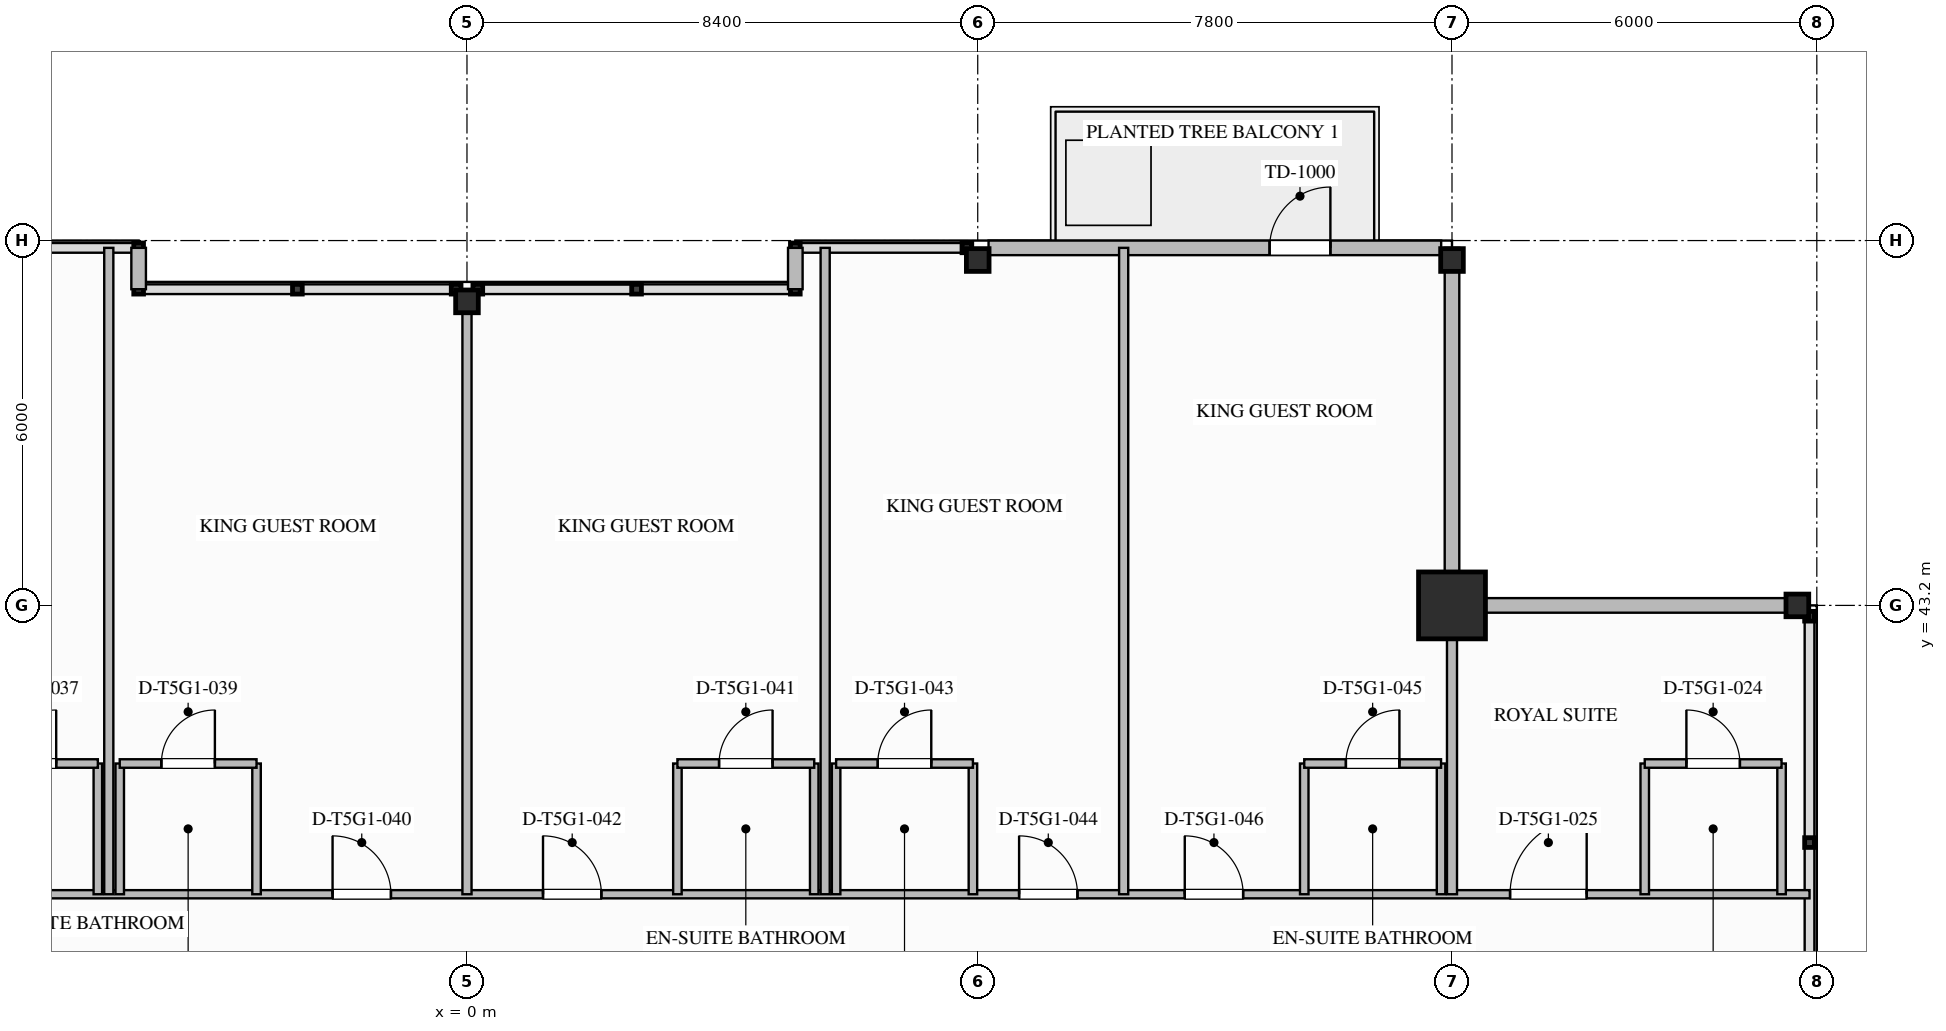
"""IFC4 building model, lengths in metres.
Left out: names, types, materials, properties, quantities, classifications, styles, units other than length and angle.
Written with IfcOpenShell. Run it as: python <this file> out.ifc"""

import sys

from ifc_helpers import new_model, si_unit, direction, frame, frame_2d, origin, origin_2d, place, context, subcontext, project, spatial, rectangle, i_section, extrude, element, fill, save


model = new_model("IFC4")
c1 = context("Model", 3, precision=1e-05, world=origin(), true_north=direction((0.0, 1.0)))
c2 = subcontext(c1, "Body", "Model", "MODEL_VIEW")
j1 = project(units=[si_unit("LENGTHUNIT", "METRE"), si_unit("PLANEANGLEUNIT", "RADIAN")], contexts=[c1])
p1 = place(None, origin())
s1 = spatial("IfcSite", under=j1, at=p1, CompositionType="ELEMENT")
p2 = place(p1, origin())
s2 = spatial("IfcBuilding", under=s1, at=p2, CompositionType="ELEMENT")
p3 = place(p2, frame((0.0, 0.0, 265.0)))
s3 = spatial("IfcBuildingStorey", under=s2, at=p3, CompositionType="ELEMENT", Elevation=265.0)
p4 = place(p3, frame((16.2, 43.2, 0.0), z_axis=(0.0, 0.0, 1.0), x_axis=(1.0, 0.0, 0.0)))
e1 = element("IfcColumn", 1, at=p4, inside=s3, PredefinedType="COLUMN", context=c2, shape_type="SweptSolid", body=[
    extrude(rectangle(XDim=1.1, YDim=1.1, at=origin_2d()), origin(), (0.0, 0.0, 1.0), 3.65),
])
for number, where, z_axis, x_axis in (
    (2, (21.88, 43.2, 0.0), (0.0, 0.0, 1.0), (1.0, 0.0, 0.0)),
    (3, (0.0, 48.2, 0.0), (0.0, 0.0, 1.0), (0.0, 1.0, 0.0)),
    (4, (8.4, 48.88, 0.0), (0.0, 0.0, 1.0), (0.0, 1.0, 0.0)),
    (5, (16.2, 48.88, 0.0), (0.0, 0.0, 1.0), (0.0, 1.0, 0.0)),
):
    element("IfcColumn", number, at=place(p3, frame(where, z_axis=z_axis, x_axis=x_axis)), inside=s3, PredefinedType="COLUMN", context=c2, shape_type="SweptSolid", body=[
        extrude(i_section(OverallWidth=0.374, OverallDepth=0.372, WebThickness=0.016, FlangeThickness=0.026, FilletRadius=0.025, at=origin_2d()), origin(), (0.0, 0.0, 1.0), 3.647),
    ])
p5 = place(p3, frame((8.578, 49.08, 0.0), z_axis=(0.0, 0.0, 1.0), x_axis=(1.0, 0.0, 0.0)))
e6 = element("IfcWall", 6, at=p5, inside=s3, PredefinedType="STANDARD", context=c2, shape_type="SweptSolid", body=[
    extrude(rectangle(XDim=7.444, YDim=0.24, at=frame_2d((3.722, 0.0))), origin(), (0.0, 0.0, 1.0), 2.853),
])
p6 = place(p5, frame((4.622, 0.0, 0.0)))
e7 = element("IfcOpeningElement", 7, at=p6, cuts=e6, PredefinedType="OPENING", context=c2, shape_type="SweptSolid", body=[
    extrude(rectangle(XDim=1.0, YDim=2.2, at=frame_2d((0.5, 1.1))), frame((0.0, 0.13, 0.0), z_axis=(0.0, -1.0, 0.0), x_axis=(1.0, 0.0, 0.0)), (0.0, 0.0, 1.0), 0.26),
])
for number, where, z_axis, x_axis in (
    (8, (16.2, 49.08, 0.0), (0.0, 0.0, 1.0), (0.0, -1.0, 0.0)),
    (9, (16.2, 43.2, 0.0), (0.0, 0.0, 1.0), (1.0, 0.0, 0.0)),
):
    element("IfcWall", number, at=place(p3, frame(where, z_axis=z_axis, x_axis=x_axis)), inside=s3, PredefinedType="STANDARD", context=c2, shape_type="SweptSolid", body=[
        extrude(rectangle(XDim=5.88, YDim=0.24, at=frame_2d((2.94, 0.0))), origin(), (0.0, 0.0, 1.0), 2.779),
    ])
for number, where, z_axis, x_axis in (
    (10, (-5.4, 49.08, 0.0), (0.0, 0.0, 1.0), (0.0, -1.0, 0.0)),
    (11, (5.4, 48.4, 0.0), (0.0, 0.0, 1.0), (0.0, 1.0, 0.0)),
):
    element("IfcWall", number, at=place(p3, frame(where, z_axis=z_axis, x_axis=x_axis)), inside=s3, PredefinedType="STANDARD", context=c2, shape_type="SweptSolid", body=[
        extrude(rectangle(XDim=0.68, YDim=0.24, at=frame_2d((0.34, 0.0))), origin(), (0.0, 0.0, 1.0), 3.39),
    ])
p7 = place(p3, frame((-16.2, 38.45, 0.0), z_axis=(0.0, 0.0, 1.0), x_axis=(1.0, 0.0, 0.0)))
e12 = element("IfcWall", 12, at=p7, inside=s3, PredefinedType="PARTITIONING", context=c2, shape_type="SweptSolid", body=[
    extrude(rectangle(XDim=38.28, YDim=0.135, at=frame_2d((19.14, 0.0))), origin(), (0.0, 0.0, 1.0), 3.39),
])
p8 = place(p7, frame((33.355, 0.0, 0.0)))
e13 = element("IfcOpeningElement", 13, at=p8, cuts=e12, PredefinedType="OPENING", context=c2, shape_type="SweptSolid", body=[
    extrude(rectangle(XDim=1.26, YDim=2.2, at=frame_2d((0.63, 1.1))), frame((0.0, 0.077, 0.0), z_axis=(0.0, -1.0, 0.0), x_axis=(1.0, 0.0, 0.0)), (0.0, 0.0, 1.0), 0.155),
])
p9 = place(p7, frame((3.435, 0.0, 0.0)))
e14 = element("IfcOpeningElement", 14, at=p9, cuts=e12, PredefinedType="OPENING", context=c2, shape_type="SweptSolid", body=[
    extrude(rectangle(XDim=0.96, YDim=2.15, at=frame_2d((0.48, 1.075))), frame((0.0, 0.077, 0.0), z_axis=(0.0, -1.0, 0.0), x_axis=(1.0, 0.0, 0.0)), (0.0, 0.0, 1.0), 0.155),
])
p10 = place(p7, frame((6.16, 0.0, 0.0)))
e15 = element("IfcOpeningElement", 15, at=p10, cuts=e12, PredefinedType="OPENING", context=c2, shape_type="SweptSolid", body=[
    extrude(rectangle(XDim=0.96, YDim=2.15, at=frame_2d((0.48, 1.075))), frame((0.0, 0.077, 0.0), z_axis=(0.0, -1.0, 0.0), x_axis=(1.0, 0.0, 0.0)), (0.0, 0.0, 1.0), 0.155),
])
p11 = place(p7, frame((13.99, 0.0, 0.0)))
e16 = element("IfcOpeningElement", 16, at=p11, cuts=e12, PredefinedType="OPENING", context=c2, shape_type="SweptSolid", body=[
    extrude(rectangle(XDim=0.96, YDim=2.15, at=frame_2d((0.48, 1.075))), frame((0.0, 0.077, 0.0), z_axis=(0.0, -1.0, 0.0), x_axis=(1.0, 0.0, 0.0)), (0.0, 0.0, 1.0), 0.155),
])
p12 = place(p7, frame((17.45, 0.0, 0.0)))
e17 = element("IfcOpeningElement", 17, at=p12, cuts=e12, PredefinedType="OPENING", context=c2, shape_type="SweptSolid", body=[
    extrude(rectangle(XDim=0.96, YDim=2.15, at=frame_2d((0.48, 1.075))), frame((0.0, 0.077, 0.0), z_axis=(0.0, -1.0, 0.0), x_axis=(1.0, 0.0, 0.0)), (0.0, 0.0, 1.0), 0.155),
])
p13 = place(p7, frame((25.281, 0.0, 0.0)))
e18 = element("IfcOpeningElement", 18, at=p13, cuts=e12, PredefinedType="OPENING", context=c2, shape_type="SweptSolid", body=[
    extrude(rectangle(XDim=0.96, YDim=2.15, at=frame_2d((0.48, 1.075))), frame((0.0, 0.077, 0.0), z_axis=(0.0, -1.0, 0.0), x_axis=(1.0, 0.0, 0.0)), (0.0, 0.0, 1.0), 0.155),
])
p14 = place(p7, frame((28.005, 0.0, 0.0)))
e19 = element("IfcOpeningElement", 19, at=p14, cuts=e12, PredefinedType="OPENING", context=c2, shape_type="SweptSolid", body=[
    extrude(rectangle(XDim=0.96, YDim=2.15, at=frame_2d((0.48, 1.075))), frame((0.0, 0.077, 0.0), z_axis=(0.0, -1.0, 0.0), x_axis=(1.0, 0.0, 0.0)), (0.0, 0.0, 1.0), 0.155),
])
p15 = place(p3, frame((16.2, 38.45, 0.0), z_axis=(0.0, 0.0, 1.0), x_axis=(0.0, 1.0, 0.0)))
e20 = element("IfcWall", 20, at=p15, inside=s3, PredefinedType="PARTITIONING", context=c2, shape_type="SweptSolid", body=[
    extrude(rectangle(XDim=4.63, YDim=0.165, at=frame_2d((2.315, 0.0))), origin(), (0.0, 0.0, 1.0), 2.764),
])
for number, where, z_axis, x_axis in (
    (21, (19.37, 38.45, 0.0), (0.0, 0.0, 1.0), (0.0, 1.0, 0.0)),
    (22, (21.62, 38.45, 0.0), (0.0, 0.0, 1.0), (0.0, 1.0, 0.0)),
):
    element("IfcWall", number, at=place(p3, frame(where, z_axis=z_axis, x_axis=x_axis)), inside=s3, PredefinedType="PLUMBINGWALL", context=c2, shape_type="SweptSolid", body=[
        extrude(rectangle(XDim=2.15, YDim=0.14, at=frame_2d((1.075, 0.0))), origin(), (0.0, 0.0, 1.0), 3.39),
    ])
p16 = place(p3, frame((19.37, 40.6, 0.0), z_axis=(0.0, 0.0, 1.0), x_axis=(1.0, 0.0, 0.0)))
e23 = element("IfcWall", 23, at=p16, inside=s3, PredefinedType="PLUMBINGWALL", context=c2, shape_type="SweptSolid", body=[
    extrude(rectangle(XDim=2.25, YDim=0.14, at=frame_2d((1.125, 0.0))), origin(), (0.0, 0.0, 1.0), 3.39),
])
p17 = place(p16, frame((0.685, 0.0, 0.0)))
e24 = element("IfcOpeningElement", 24, at=p17, cuts=e23, PredefinedType="OPENING", context=c2, shape_type="SweptSolid", body=[
    extrude(rectangle(XDim=0.88, YDim=2.1, at=frame_2d((0.44, 1.05))), frame((0.0, 0.08, 0.0), z_axis=(0.0, -1.0, 0.0), x_axis=(1.0, 0.0, 0.0)), (0.0, 0.0, 1.0), 0.16),
])
p18 = place(p3, frame((-6.071, 38.45, 0.0), z_axis=(0.0, 0.0, 1.0), x_axis=(0.0, 1.0, 0.0)))
e25 = element("IfcWall", 25, at=p18, inside=s3, PredefinedType="PLUMBINGWALL", context=c2, shape_type="SweptSolid", body=[
    extrude(rectangle(XDim=2.15, YDim=0.14, at=frame_2d((1.075, 0.0))), origin(), (0.0, 0.0, 1.0), 3.39),
])
p19 = place(p3, frame((-8.321, 40.6, 0.0), z_axis=(0.0, 0.0, 1.0), x_axis=(1.0, 0.0, 0.0)))
e26 = element("IfcWall", 26, at=p19, inside=s3, PredefinedType="PLUMBINGWALL", context=c2, shape_type="SweptSolid", body=[
    extrude(rectangle(XDim=2.25, YDim=0.14, at=frame_2d((1.125, 0.0))), origin(), (0.0, 0.0, 1.0), 3.39),
])
p20 = place(p19, frame((0.685, 0.0, 0.0)))
e27 = element("IfcOpeningElement", 27, at=p20, cuts=e26, PredefinedType="OPENING", context=c2, shape_type="SweptSolid", body=[
    extrude(rectangle(XDim=0.88, YDim=2.1, at=frame_2d((0.44, 1.05))), frame((0.0, 0.08, 0.0), z_axis=(0.0, -1.0, 0.0), x_axis=(1.0, 0.0, 0.0)), (0.0, 0.0, 1.0), 0.16),
])
p21 = place(p3, frame((-5.891, 38.45, 0.0), z_axis=(0.0, 0.0, 1.0), x_axis=(0.0, 1.0, 0.0)))
e28 = element("IfcWall", 28, at=p21, inside=s3, PredefinedType="PARTITIONING", context=c2, shape_type="SweptSolid", body=[
    extrude(rectangle(XDim=10.63, YDim=0.15, at=frame_2d((5.315, 0.0))), origin(), (0.0, 0.0, 1.0), 3.39),
])
for number, where, z_axis, x_axis in (
    (29, (-5.711, 38.45, 0.0), (0.0, 0.0, 1.0), (0.0, 1.0, 0.0)),
    (30, (-3.461, 38.45, 0.0), (0.0, 0.0, 1.0), (0.0, 1.0, 0.0)),
):
    element("IfcWall", number, at=place(p3, frame(where, z_axis=z_axis, x_axis=x_axis)), inside=s3, PredefinedType="PLUMBINGWALL", context=c2, shape_type="SweptSolid", body=[
        extrude(rectangle(XDim=2.15, YDim=0.14, at=frame_2d((1.075, 0.0))), origin(), (0.0, 0.0, 1.0), 3.39),
    ])
p22 = place(p3, frame((-5.711, 40.6, 0.0), z_axis=(0.0, 0.0, 1.0), x_axis=(1.0, 0.0, 0.0)))
e31 = element("IfcWall", 31, at=p22, inside=s3, PredefinedType="PLUMBINGWALL", context=c2, shape_type="SweptSolid", body=[
    extrude(rectangle(XDim=2.25, YDim=0.14, at=frame_2d((1.125, 0.0))), origin(), (0.0, 0.0, 1.0), 3.39),
])
p23 = place(p22, frame((0.685, 0.0, 0.0)))
e32 = element("IfcOpeningElement", 32, at=p23, cuts=e31, PredefinedType="OPENING", context=c2, shape_type="SweptSolid", body=[
    extrude(rectangle(XDim=0.88, YDim=2.1, at=frame_2d((0.44, 1.05))), frame((0.0, 0.08, 0.0), z_axis=(0.0, -1.0, 0.0), x_axis=(1.0, 0.0, 0.0)), (0.0, 0.0, 1.0), 0.16),
])
p24 = place(p3, frame((0.0, 38.45, 0.0), z_axis=(0.0, 0.0, 1.0), x_axis=(0.0, 1.0, 0.0)))
e33 = element("IfcWall", 33, at=p24, inside=s3, PredefinedType="PARTITIONING", context=c2, shape_type="SweptSolid", body=[
    extrude(rectangle(XDim=9.95, YDim=0.15, at=frame_2d((4.975, 0.0))), origin(), (0.0, 0.0, 1.0), 2.767),
])
for number, where, z_axis, x_axis in (
    (34, (3.461, 38.45, 0.0), (0.0, 0.0, 1.0), (0.0, 1.0, 0.0)),
    (35, (5.711, 38.45, 0.0), (0.0, 0.0, 1.0), (0.0, 1.0, 0.0)),
):
    element("IfcWall", number, at=place(p3, frame(where, z_axis=z_axis, x_axis=x_axis)), inside=s3, PredefinedType="PLUMBINGWALL", context=c2, shape_type="SweptSolid", body=[
        extrude(rectangle(XDim=2.15, YDim=0.14, at=frame_2d((1.075, 0.0))), origin(), (0.0, 0.0, 1.0), 3.39),
    ])
p25 = place(p3, frame((3.461, 40.6, 0.0), z_axis=(0.0, 0.0, 1.0), x_axis=(1.0, 0.0, 0.0)))
e36 = element("IfcWall", 36, at=p25, inside=s3, PredefinedType="PLUMBINGWALL", context=c2, shape_type="SweptSolid", body=[
    extrude(rectangle(XDim=2.25, YDim=0.14, at=frame_2d((1.125, 0.0))), origin(), (0.0, 0.0, 1.0), 3.39),
])
p26 = place(p25, frame((0.685, 0.0, 0.0)))
e37 = element("IfcOpeningElement", 37, at=p26, cuts=e36, PredefinedType="OPENING", context=c2, shape_type="SweptSolid", body=[
    extrude(rectangle(XDim=0.88, YDim=2.1, at=frame_2d((0.44, 1.05))), frame((0.0, 0.08, 0.0), z_axis=(0.0, -1.0, 0.0), x_axis=(1.0, 0.0, 0.0)), (0.0, 0.0, 1.0), 0.16),
])
p27 = place(p3, frame((5.891, 38.45, 0.0), z_axis=(0.0, 0.0, 1.0), x_axis=(0.0, 1.0, 0.0)))
e38 = element("IfcWall", 38, at=p27, inside=s3, PredefinedType="PARTITIONING", context=c2, shape_type="SweptSolid", body=[
    extrude(rectangle(XDim=10.63, YDim=0.15, at=frame_2d((5.315, 0.0))), origin(), (0.0, 0.0, 1.0), 3.39),
])
p28 = place(p3, frame((6.071, 38.45, 0.0), z_axis=(0.0, 0.0, 1.0), x_axis=(0.0, 1.0, 0.0)))
e39 = element("IfcWall", 39, at=p28, inside=s3, PredefinedType="PLUMBINGWALL", context=c2, shape_type="SweptSolid", body=[
    extrude(rectangle(XDim=2.15, YDim=0.14, at=frame_2d((1.075, 0.0))), origin(), (0.0, 0.0, 1.0), 3.39),
])
p29 = place(p3, frame((8.321, 38.45, 0.0), z_axis=(0.0, 0.0, 1.0), x_axis=(0.0, 1.0, 0.0)))
e40 = element("IfcWall", 40, at=p29, inside=s3, PredefinedType="PLUMBINGWALL", context=c2, shape_type="SweptSolid", body=[
    extrude(rectangle(XDim=2.15, YDim=0.14, at=frame_2d((1.075, 0.0))), origin(), (0.0, 0.0, 1.0), 2.767),
])
p30 = place(p3, frame((6.071, 40.6, 0.0), z_axis=(0.0, 0.0, 1.0), x_axis=(1.0, 0.0, 0.0)))
e41 = element("IfcWall", 41, at=p30, inside=s3, PredefinedType="PLUMBINGWALL", context=c2, shape_type="SweptSolid", body=[
    extrude(rectangle(XDim=2.25, YDim=0.14, at=frame_2d((1.125, 0.0))), origin(), (0.0, 0.0, 1.0), 3.39),
])
p31 = place(p30, frame((0.685, 0.0, 0.0)))
e42 = element("IfcOpeningElement", 42, at=p31, cuts=e41, PredefinedType="OPENING", context=c2, shape_type="SweptSolid", body=[
    extrude(rectangle(XDim=0.88, YDim=2.1, at=frame_2d((0.44, 1.05))), frame((0.0, 0.08, 0.0), z_axis=(0.0, -1.0, 0.0), x_axis=(1.0, 0.0, 0.0)), (0.0, 0.0, 1.0), 0.16),
])
p32 = place(p3, frame((10.8, 38.45, 0.0), z_axis=(0.0, 0.0, 1.0), x_axis=(0.0, 1.0, 0.0)))
e43 = element("IfcWall", 43, at=p32, inside=s3, PredefinedType="PARTITIONING", context=c2, shape_type="SweptSolid", body=[
    extrude(rectangle(XDim=10.63, YDim=0.15, at=frame_2d((5.315, 0.0))), origin(), (0.0, 0.0, 1.0), 3.39),
])
p33 = place(p3, frame((13.77, 38.45, 0.0), z_axis=(0.0, 0.0, 1.0), x_axis=(0.0, 1.0, 0.0)))
e44 = element("IfcWall", 44, at=p33, inside=s3, PredefinedType="PLUMBINGWALL", context=c2, shape_type="SweptSolid", body=[
    extrude(rectangle(XDim=2.15, YDim=0.14, at=frame_2d((1.075, 0.0))), origin(), (0.0, 0.0, 1.0), 3.39),
])
p34 = place(p3, frame((16.02, 38.45, 0.0), z_axis=(0.0, 0.0, 1.0), x_axis=(0.0, 1.0, 0.0)))
e45 = element("IfcWall", 45, at=p34, inside=s3, PredefinedType="PLUMBINGWALL", context=c2, shape_type="SweptSolid", body=[
    extrude(rectangle(XDim=2.15, YDim=0.14, at=frame_2d((1.075, 0.0))), origin(), (0.0, 0.0, 1.0), 2.764),
])
p35 = place(p3, frame((13.77, 40.6, 0.0), z_axis=(0.0, 0.0, 1.0), x_axis=(1.0, 0.0, 0.0)))
e46 = element("IfcWall", 46, at=p35, inside=s3, PredefinedType="PLUMBINGWALL", context=c2, shape_type="SweptSolid", body=[
    extrude(rectangle(XDim=2.25, YDim=0.14, at=frame_2d((1.125, 0.0))), origin(), (0.0, 0.0, 1.0), 3.39),
])
p36 = place(p35, frame((0.685, 0.0, 0.0)))
e47 = element("IfcOpeningElement", 47, at=p36, cuts=e46, PredefinedType="OPENING", context=c2, shape_type="SweptSolid", body=[
    extrude(rectangle(XDim=0.88, YDim=2.1, at=frame_2d((0.44, 1.05))), frame((0.0, 0.08, 0.0), z_axis=(0.0, -1.0, 0.0), x_axis=(1.0, 0.0, 0.0)), (0.0, 0.0, 1.0), 0.16),
])
p37 = place(p6, origin())
e48 = element("IfcDoor", 48, at=p37, inside=s3, OperationType="SINGLE_SWING_RIGHT", PredefinedType="DOOR", context=c2, shape_type="SweptSolid", body=[
    extrude(rectangle(XDim=1.0, YDim=2.2, at=frame_2d((0.5, 1.1))), frame((0.0, 0.025, 0.0), z_axis=(0.0, -1.0, 0.0), x_axis=(1.0, 0.0, 0.0)), (0.0, 0.0, 1.0), 0.05),
])
fill(e7, e48)
p38 = place(p17, origin())
e49 = element("IfcDoor", 49, at=p38, inside=s3, OperationType="SINGLE_SWING_LEFT", PredefinedType="DOOR", context=c2, shape_type="SweptSolid", body=[
    extrude(rectangle(XDim=0.88, YDim=2.1, at=frame_2d((0.44, 1.05))), frame((0.0, 0.025, 0.0), z_axis=(0.0, -1.0, 0.0), x_axis=(1.0, 0.0, 0.0)), (0.0, 0.0, 1.0), 0.05),
])
fill(e24, e49)
p39 = place(p8, origin())
e50 = element("IfcDoor", 50, at=p39, inside=s3, OperationType="SINGLE_SWING_RIGHT", PredefinedType="DOOR", context=c2, shape_type="SweptSolid", body=[
    extrude(rectangle(XDim=1.26, YDim=2.2, at=frame_2d((0.63, 1.1))), frame((0.0, 0.025, 0.0), z_axis=(0.0, -1.0, 0.0), x_axis=(1.0, 0.0, 0.0)), (0.0, 0.0, 1.0), 0.05),
])
fill(e13, e50)
p40 = place(p20, origin())
e51 = element("IfcDoor", 51, at=p40, inside=s3, OperationType="SINGLE_SWING_RIGHT", PredefinedType="DOOR", context=c2, shape_type="SweptSolid", body=[
    extrude(rectangle(XDim=0.88, YDim=2.1, at=frame_2d((0.44, 1.05))), frame((0.0, 0.025, 0.0), z_axis=(0.0, -1.0, 0.0), x_axis=(1.0, 0.0, 0.0)), (0.0, 0.0, 1.0), 0.05),
])
fill(e27, e51)
p41 = place(p23, origin())
e52 = element("IfcDoor", 52, at=p41, inside=s3, OperationType="SINGLE_SWING_RIGHT", PredefinedType="DOOR", context=c2, shape_type="SweptSolid", body=[
    extrude(rectangle(XDim=0.88, YDim=2.1, at=frame_2d((0.44, 1.05))), frame((0.0, 0.025, 0.0), z_axis=(0.0, -1.0, 0.0), x_axis=(1.0, 0.0, 0.0)), (0.0, 0.0, 1.0), 0.05),
])
fill(e32, e52)
p42 = place(p11, origin())
e53 = element("IfcDoor", 53, at=p42, inside=s3, OperationType="SINGLE_SWING_LEFT", PredefinedType="DOOR", context=c2, shape_type="SweptSolid", body=[
    extrude(rectangle(XDim=0.96, YDim=2.15, at=frame_2d((0.48, 1.075))), frame((0.0, 0.025, 0.0), z_axis=(0.0, -1.0, 0.0), x_axis=(1.0, 0.0, 0.0)), (0.0, 0.0, 1.0), 0.05),
])
fill(e16, e53)
p43 = place(p26, origin())
e54 = element("IfcDoor", 54, at=p43, inside=s3, OperationType="SINGLE_SWING_RIGHT", PredefinedType="DOOR", context=c2, shape_type="SweptSolid", body=[
    extrude(rectangle(XDim=0.88, YDim=2.1, at=frame_2d((0.44, 1.05))), frame((0.0, 0.025, 0.0), z_axis=(0.0, -1.0, 0.0), x_axis=(1.0, 0.0, 0.0)), (0.0, 0.0, 1.0), 0.05),
])
fill(e37, e54)
p44 = place(p12, origin())
e55 = element("IfcDoor", 55, at=p44, inside=s3, OperationType="SINGLE_SWING_LEFT", PredefinedType="DOOR", context=c2, shape_type="SweptSolid", body=[
    extrude(rectangle(XDim=0.96, YDim=2.15, at=frame_2d((0.48, 1.075))), frame((0.0, 0.025, 0.0), z_axis=(0.0, -1.0, 0.0), x_axis=(1.0, 0.0, 0.0)), (0.0, 0.0, 1.0), 0.05),
])
fill(e17, e55)
p45 = place(p31, origin())
e56 = element("IfcDoor", 56, at=p45, inside=s3, OperationType="SINGLE_SWING_RIGHT", PredefinedType="DOOR", context=c2, shape_type="SweptSolid", body=[
    extrude(rectangle(XDim=0.88, YDim=2.1, at=frame_2d((0.44, 1.05))), frame((0.0, 0.025, 0.0), z_axis=(0.0, -1.0, 0.0), x_axis=(1.0, 0.0, 0.0)), (0.0, 0.0, 1.0), 0.05),
])
fill(e42, e56)
p46 = place(p13, origin())
e57 = element("IfcDoor", 57, at=p46, inside=s3, OperationType="SINGLE_SWING_LEFT", PredefinedType="DOOR", context=c2, shape_type="SweptSolid", body=[
    extrude(rectangle(XDim=0.96, YDim=2.15, at=frame_2d((0.48, 1.075))), frame((0.0, 0.025, 0.0), z_axis=(0.0, -1.0, 0.0), x_axis=(1.0, 0.0, 0.0)), (0.0, 0.0, 1.0), 0.05),
])
fill(e18, e57)
p47 = place(p36, origin())
e58 = element("IfcDoor", 58, at=p47, inside=s3, OperationType="SINGLE_SWING_RIGHT", PredefinedType="DOOR", context=c2, shape_type="SweptSolid", body=[
    extrude(rectangle(XDim=0.88, YDim=2.1, at=frame_2d((0.44, 1.05))), frame((0.0, 0.025, 0.0), z_axis=(0.0, -1.0, 0.0), x_axis=(1.0, 0.0, 0.0)), (0.0, 0.0, 1.0), 0.05),
])
fill(e47, e58)
p48 = place(p14, origin())
e59 = element("IfcDoor", 59, at=p48, inside=s3, OperationType="SINGLE_SWING_LEFT", PredefinedType="DOOR", context=c2, shape_type="SweptSolid", body=[
    extrude(rectangle(XDim=0.96, YDim=2.15, at=frame_2d((0.48, 1.075))), frame((0.0, 0.025, 0.0), z_axis=(0.0, -1.0, 0.0), x_axis=(1.0, 0.0, 0.0)), (0.0, 0.0, 1.0), 0.05),
])
fill(e19, e59)
save(model, sys.argv[1])
